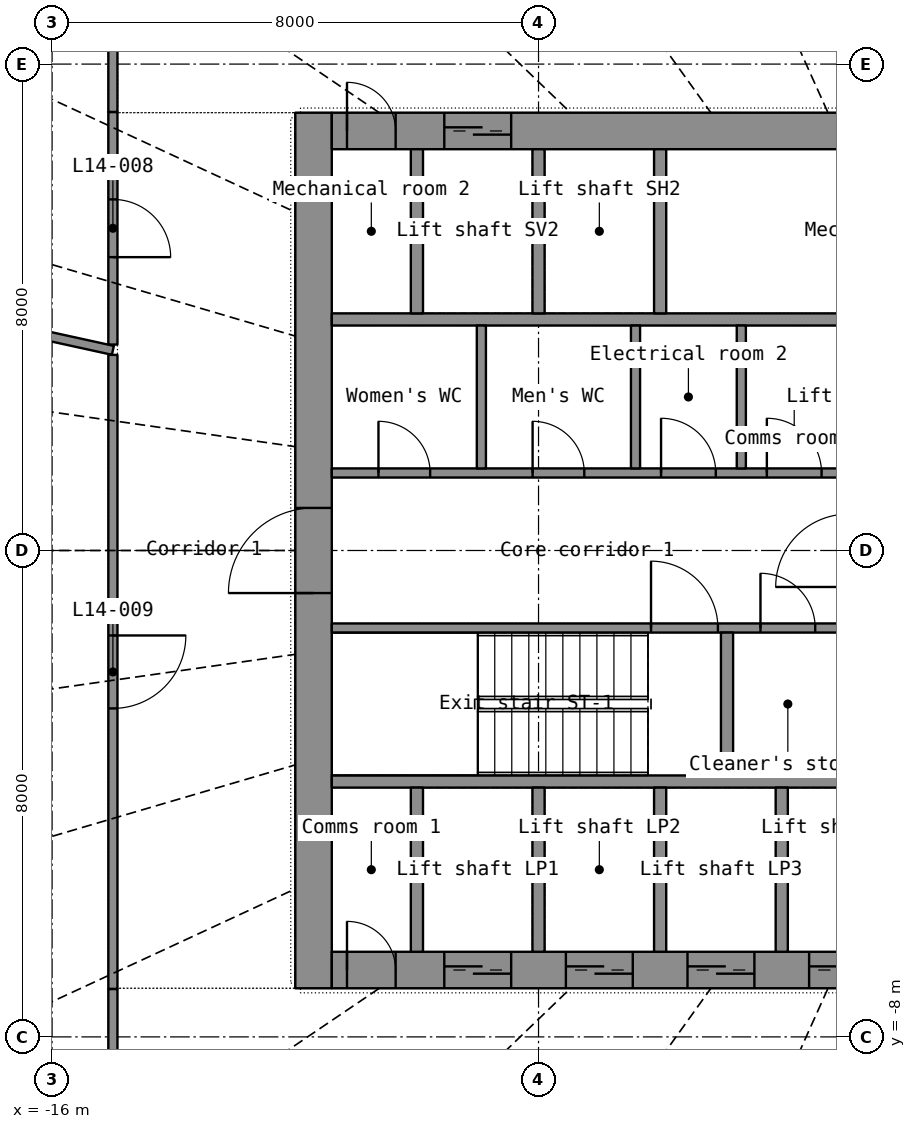
"""IFC4 building model, lengths in metres.
Left out: names, types, materials, properties, quantities, classifications, styles, units other than length and angle.
Written with IfcOpenShell. Run it as: python <this file> out.ifc"""

import sys

from ifc_helpers import new_model, si_unit, direction, frame, frame_2d, origin, place, context, subcontext, project, spatial, rectangle, extrude, element, fill, save


model = new_model("IFC4")
c1 = context("Model", 3, precision=1e-05, world=origin(), true_north=direction((0.0, 1.0)))
c2 = subcontext(c1, "Body", "Model", "MODEL_VIEW")
j1 = project(units=[si_unit("LENGTHUNIT", "METRE"), si_unit("PLANEANGLEUNIT", "RADIAN")], contexts=[c1])
p1 = place(None, origin())
s1 = spatial("IfcSite", under=j1, at=p1, CompositionType="ELEMENT")
p2 = place(p1, origin())
s2 = spatial("IfcBuilding", under=s1, at=p2, CompositionType="ELEMENT")
p3 = place(p2, frame((0.0, 0.0, 63.0)))
s3 = spatial("IfcBuildingStorey", under=s2, at=p3, CompositionType="ELEMENT", Elevation=63.0)
p4 = place(p3, frame((-11.7, -7.2, 0.0), z_axis=(0.0, 0.0, 1.0), x_axis=(0.0, 1.0, 0.0)))
e1 = element("IfcWall", 1, at=p4, inside=s3, PredefinedType="SHEAR", context=c2, shape_type="SweptSolid", body=[
    extrude(rectangle(XDim=14.4, YDim=0.6, at=frame_2d((7.2, 0.0))), origin(), (0.0, 0.0, 1.0), 3.3),
])
p5 = place(p4, frame((6.5, 0.0, 0.0)))
e2 = element("IfcOpeningElement", 2, at=p5, cuts=e1, PredefinedType="OPENING", context=c2, shape_type="SweptSolid", body=[
    extrude(rectangle(XDim=1.4, YDim=2.2, at=frame_2d((0.7, 1.1))), frame((0.0, 0.31, 0.0), z_axis=(0.0, -1.0, 0.0), x_axis=(1.0, 0.0, 0.0)), (0.0, 0.0, 1.0), 0.62),
])
p6 = place(p3, frame((-11.4, -6.9, 0.0), z_axis=(0.0, 0.0, 1.0), x_axis=(1.0, 0.0, 0.0)))
e3 = element("IfcWall", 3, at=p6, inside=s3, PredefinedType="SHEAR", context=c2, shape_type="SweptSolid", body=[
    extrude(rectangle(XDim=22.8, YDim=0.6, at=frame_2d((11.4, 0.0))), origin(), (0.0, 0.0, 1.0), 3.3),
])
p7 = place(p6, frame((1.85, 0.0, 0.0)))
e4 = element("IfcOpeningElement", 4, at=p7, cuts=e3, PredefinedType="OPENING", context=c2, shape_type="SweptSolid", body=[
    extrude(rectangle(XDim=1.1, YDim=2.2, at=frame_2d((0.55, 1.1))), frame((0.0, 0.31, 0.0), z_axis=(0.0, -1.0, 0.0), x_axis=(1.0, 0.0, 0.0)), (0.0, 0.0, 1.0), 0.62),
])
p8 = place(p6, frame((3.85, 0.0, 0.0)))
e5 = element("IfcOpeningElement", 5, at=p8, cuts=e3, PredefinedType="OPENING", context=c2, shape_type="SweptSolid", body=[
    extrude(rectangle(XDim=1.1, YDim=2.2, at=frame_2d((0.55, 1.1))), frame((0.0, 0.31, 0.0), z_axis=(0.0, -1.0, 0.0), x_axis=(1.0, 0.0, 0.0)), (0.0, 0.0, 1.0), 0.62),
])
p9 = place(p6, frame((5.85, 0.0, 0.0)))
e6 = element("IfcOpeningElement", 6, at=p9, cuts=e3, PredefinedType="OPENING", context=c2, shape_type="SweptSolid", body=[
    extrude(rectangle(XDim=1.1, YDim=2.2, at=frame_2d((0.55, 1.1))), frame((0.0, 0.31, 0.0), z_axis=(0.0, -1.0, 0.0), x_axis=(1.0, 0.0, 0.0)), (0.0, 0.0, 1.0), 0.62),
])
p10 = place(p6, frame((7.85, 0.0, 0.0)))
e7 = element("IfcOpeningElement", 7, at=p10, cuts=e3, PredefinedType="OPENING", context=c2, shape_type="SweptSolid", body=[
    extrude(rectangle(XDim=1.1, YDim=2.2, at=frame_2d((0.55, 1.1))), frame((0.0, 0.31, 0.0), z_axis=(0.0, -1.0, 0.0), x_axis=(1.0, 0.0, 0.0)), (0.0, 0.0, 1.0), 0.62),
])
p11 = place(p6, frame((9.85, 0.0, 0.0)))
e8 = element("IfcOpeningElement", 8, at=p11, cuts=e3, PredefinedType="OPENING", context=c2, shape_type="SweptSolid", body=[
    extrude(rectangle(XDim=1.1, YDim=2.2, at=frame_2d((0.55, 1.1))), frame((0.0, 0.31, 0.0), z_axis=(0.0, -1.0, 0.0), x_axis=(1.0, 0.0, 0.0)), (0.0, 0.0, 1.0), 0.62),
])
p12 = place(p6, frame((11.85, 0.0, 0.0)))
e9 = element("IfcOpeningElement", 9, at=p12, cuts=e3, PredefinedType="OPENING", context=c2, shape_type="SweptSolid", body=[
    extrude(rectangle(XDim=1.1, YDim=2.2, at=frame_2d((0.55, 1.1))), frame((0.0, 0.31, 0.0), z_axis=(0.0, -1.0, 0.0), x_axis=(1.0, 0.0, 0.0)), (0.0, 0.0, 1.0), 0.62),
])
p13 = place(p6, frame((13.85, 0.0, 0.0)))
e10 = element("IfcOpeningElement", 10, at=p13, cuts=e3, PredefinedType="OPENING", context=c2, shape_type="SweptSolid", body=[
    extrude(rectangle(XDim=1.1, YDim=2.2, at=frame_2d((0.55, 1.1))), frame((0.0, 0.31, 0.0), z_axis=(0.0, -1.0, 0.0), x_axis=(1.0, 0.0, 0.0)), (0.0, 0.0, 1.0), 0.62),
])
p14 = place(p6, frame((15.85, 0.0, 0.0)))
e11 = element("IfcOpeningElement", 11, at=p14, cuts=e3, PredefinedType="OPENING", context=c2, shape_type="SweptSolid", body=[
    extrude(rectangle(XDim=1.1, YDim=2.2, at=frame_2d((0.55, 1.1))), frame((0.0, 0.31, 0.0), z_axis=(0.0, -1.0, 0.0), x_axis=(1.0, 0.0, 0.0)), (0.0, 0.0, 1.0), 0.62),
])
p15 = place(p6, frame((19.85, 0.0, 0.0)))
e12 = element("IfcOpeningElement", 12, at=p15, cuts=e3, PredefinedType="OPENING", context=c2, shape_type="SweptSolid", body=[
    extrude(rectangle(XDim=1.1, YDim=2.2, at=frame_2d((0.55, 1.1))), frame((0.0, 0.31, 0.0), z_axis=(0.0, -1.0, 0.0), x_axis=(1.0, 0.0, 0.0)), (0.0, 0.0, 1.0), 0.62),
])
p16 = place(p6, frame((0.25, 0.0, 0.0)))
e13 = element("IfcOpeningElement", 13, at=p16, cuts=e3, PredefinedType="OPENING", context=c2, shape_type="SweptSolid", body=[
    extrude(rectangle(XDim=0.8, YDim=2.05, at=frame_2d((0.4, 1.025))), frame((0.0, 0.31, 0.0), z_axis=(0.0, -1.0, 0.0), x_axis=(1.0, 0.0, 0.0)), (0.0, 0.0, 1.0), 0.62),
])
p17 = place(p6, frame((21.75, 0.0, 0.0)))
e14 = element("IfcOpeningElement", 14, at=p17, cuts=e3, PredefinedType="OPENING", context=c2, shape_type="SweptSolid", body=[
    extrude(rectangle(XDim=0.8, YDim=2.05, at=frame_2d((0.4, 1.025))), frame((0.0, 0.31, 0.0), z_axis=(0.0, -1.0, 0.0), x_axis=(1.0, 0.0, 0.0)), (0.0, 0.0, 1.0), 0.62),
])
p18 = place(p3, frame((-11.4, 6.9, 0.0), z_axis=(0.0, 0.0, 1.0), x_axis=(1.0, 0.0, 0.0)))
e15 = element("IfcWall", 15, at=p18, inside=s3, PredefinedType="SHEAR", context=c2, shape_type="SweptSolid", body=[
    extrude(rectangle(XDim=22.8, YDim=0.6, at=frame_2d((11.4, 0.0))), origin(), (0.0, 0.0, 1.0), 3.3),
])
p19 = place(p18, frame((1.85, 0.0, 0.0)))
e16 = element("IfcOpeningElement", 16, at=p19, cuts=e15, PredefinedType="OPENING", context=c2, shape_type="SweptSolid", body=[
    extrude(rectangle(XDim=1.1, YDim=2.2, at=frame_2d((0.55, 1.1))), frame((0.0, 0.31, 0.0), z_axis=(0.0, -1.0, 0.0), x_axis=(1.0, 0.0, 0.0)), (0.0, 0.0, 1.0), 0.62),
])
p20 = place(p18, frame((8.95, 0.0, 0.0)))
e17 = element("IfcOpeningElement", 17, at=p20, cuts=e15, PredefinedType="OPENING", context=c2, shape_type="SweptSolid", body=[
    extrude(rectangle(XDim=0.9, YDim=2.1, at=frame_2d((0.45, 1.05))), frame((0.0, 0.31, 0.0), z_axis=(0.0, -1.0, 0.0), x_axis=(1.0, 0.0, 0.0)), (0.0, 0.0, 1.0), 0.62),
])
p21 = place(p18, frame((14.95, 0.0, 0.0)))
e18 = element("IfcOpeningElement", 18, at=p21, cuts=e15, PredefinedType="OPENING", context=c2, shape_type="SweptSolid", body=[
    extrude(rectangle(XDim=0.9, YDim=2.1, at=frame_2d((0.45, 1.05))), frame((0.0, 0.31, 0.0), z_axis=(0.0, -1.0, 0.0), x_axis=(1.0, 0.0, 0.0)), (0.0, 0.0, 1.0), 0.62),
])
p22 = place(p18, frame((18.95, 0.0, 0.0)))
e19 = element("IfcOpeningElement", 19, at=p22, cuts=e15, PredefinedType="OPENING", context=c2, shape_type="SweptSolid", body=[
    extrude(rectangle(XDim=0.9, YDim=2.1, at=frame_2d((0.45, 1.05))), frame((0.0, 0.31, 0.0), z_axis=(0.0, -1.0, 0.0), x_axis=(1.0, 0.0, 0.0)), (0.0, 0.0, 1.0), 0.62),
])
p23 = place(p18, frame((0.25, 0.0, 0.0)))
e20 = element("IfcOpeningElement", 20, at=p23, cuts=e15, PredefinedType="OPENING", context=c2, shape_type="SweptSolid", body=[
    extrude(rectangle(XDim=0.8, YDim=2.05, at=frame_2d((0.4, 1.025))), frame((0.0, 0.31, 0.0), z_axis=(0.0, -1.0, 0.0), x_axis=(1.0, 0.0, 0.0)), (0.0, 0.0, 1.0), 0.62),
])
p24 = place(p18, frame((21.75, 0.0, 0.0)))
e21 = element("IfcOpeningElement", 21, at=p24, cuts=e15, PredefinedType="OPENING", context=c2, shape_type="SweptSolid", body=[
    extrude(rectangle(XDim=0.8, YDim=2.05, at=frame_2d((0.4, 1.025))), frame((0.0, 0.31, 0.0), z_axis=(0.0, -1.0, 0.0), x_axis=(1.0, 0.0, 0.0)), (0.0, 0.0, 1.0), 0.62),
])
for number, where, z_axis, x_axis in (
    (22, (-11.4, -3.8, 0.0), (0.0, 0.0, 1.0), (1.0, 0.0, 0.0)),
    (23, (-11.4, 3.8, 0.0), (0.0, 0.0, 1.0), (1.0, 0.0, 0.0)),
):
    element("IfcWall", number, at=place(p3, frame(where, z_axis=z_axis, x_axis=x_axis)), inside=s3, PredefinedType="SHEAR", context=c2, shape_type="SweptSolid", body=[
        extrude(rectangle(XDim=22.8, YDim=0.2, at=frame_2d((11.4, 0.0))), origin(), (0.0, 0.0, 1.0), 3.3),
    ])
for number, where, z_axis, x_axis in (
    (24, (-10.0, -6.6, 0.0), (0.0, 0.0, 1.0), (0.0, 1.0, 0.0)),
    (25, (-8.0, -6.6, 0.0), (0.0, 0.0, 1.0), (0.0, 1.0, 0.0)),
    (26, (-6.0, -6.6, 0.0), (0.0, 0.0, 1.0), (0.0, 1.0, 0.0)),
    (27, (-4.0, -6.6, 0.0), (0.0, 0.0, 1.0), (0.0, 1.0, 0.0)),
    (28, (-10.0, 3.9, 0.0), (0.0, 0.0, 1.0), (0.0, 1.0, 0.0)),
    (29, (-8.0, 3.9, 0.0), (0.0, 0.0, 1.0), (0.0, 1.0, 0.0)),
    (30, (-6.0, 3.9, 0.0), (0.0, 0.0, 1.0), (0.0, 1.0, 0.0)),
):
    element("IfcWall", number, at=place(p3, frame(where, z_axis=z_axis, x_axis=x_axis)), inside=s3, PredefinedType="SHEAR", context=c2, shape_type="SweptSolid", body=[
        extrude(rectangle(XDim=2.7, YDim=0.2, at=frame_2d((1.35, 0.0))), origin(), (0.0, 0.0, 1.0), 3.3),
    ])
p25 = place(p3, frame((-11.4, -1.275, 0.0), z_axis=(0.0, 0.0, 1.0), x_axis=(1.0, 0.0, 0.0)))
e31 = element("IfcWall", 31, at=p25, inside=s3, PredefinedType="SHEAR", context=c2, shape_type="SweptSolid", body=[
    extrude(rectangle(XDim=8.4, YDim=0.15, at=frame_2d((4.2, 0.0))), origin(), (0.0, 0.0, 1.0), 3.3),
])
p26 = place(p25, frame((5.25, 0.0, 0.0)))
e32 = element("IfcOpeningElement", 32, at=p26, cuts=e31, PredefinedType="OPENING", context=c2, shape_type="SweptSolid", body=[
    extrude(rectangle(XDim=1.1, YDim=2.15, at=frame_2d((0.55, 1.075))), frame((0.0, 0.085, 0.0), z_axis=(0.0, -1.0, 0.0), x_axis=(1.0, 0.0, 0.0)), (0.0, 0.0, 1.0), 0.17),
])
p27 = place(p25, frame((7.05, 0.0, 0.0)))
e33 = element("IfcOpeningElement", 33, at=p27, cuts=e31, PredefinedType="OPENING", context=c2, shape_type="SweptSolid", body=[
    extrude(rectangle(XDim=0.9, YDim=2.1, at=frame_2d((0.45, 1.05))), frame((0.0, 0.085, 0.0), z_axis=(0.0, -1.0, 0.0), x_axis=(1.0, 0.0, 0.0)), (0.0, 0.0, 1.0), 0.17),
])
p28 = place(p3, frame((-11.4, 1.275, 0.0), z_axis=(0.0, 0.0, 1.0), x_axis=(1.0, 0.0, 0.0)))
e34 = element("IfcWall", 34, at=p28, inside=s3, PredefinedType="PARTITIONING", context=c2, shape_type="SweptSolid", body=[
    extrude(rectangle(XDim=8.4, YDim=0.15, at=frame_2d((4.2, 0.0))), origin(), (0.0, 0.0, 1.0), 3.3),
])
p29 = place(p28, frame((0.768, 0.0, 0.0)))
e35 = element("IfcOpeningElement", 35, at=p29, cuts=e34, PredefinedType="OPENING", context=c2, shape_type="SweptSolid", body=[
    extrude(rectangle(XDim=0.85, YDim=2.1, at=frame_2d((0.425, 1.05))), frame((0.0, 0.085, 0.0), z_axis=(0.0, -1.0, 0.0), x_axis=(1.0, 0.0, 0.0)), (0.0, 0.0, 1.0), 0.17),
])
p30 = place(p28, frame((3.302, 0.0, 0.0)))
e36 = element("IfcOpeningElement", 36, at=p30, cuts=e34, PredefinedType="OPENING", context=c2, shape_type="SweptSolid", body=[
    extrude(rectangle(XDim=0.85, YDim=2.1, at=frame_2d((0.425, 1.05))), frame((0.0, 0.085, 0.0), z_axis=(0.0, -1.0, 0.0), x_axis=(1.0, 0.0, 0.0)), (0.0, 0.0, 1.0), 0.17),
])
p31 = place(p28, frame((5.415, 0.0, 0.0)))
e37 = element("IfcOpeningElement", 37, at=p31, cuts=e34, PredefinedType="OPENING", context=c2, shape_type="SweptSolid", body=[
    extrude(rectangle(XDim=0.9, YDim=2.1, at=frame_2d((0.45, 1.05))), frame((0.0, 0.085, 0.0), z_axis=(0.0, -1.0, 0.0), x_axis=(1.0, 0.0, 0.0)), (0.0, 0.0, 1.0), 0.17),
])
p32 = place(p28, frame((7.155, 0.0, 0.0)))
e38 = element("IfcOpeningElement", 38, at=p32, cuts=e34, PredefinedType="OPENING", context=c2, shape_type="SweptSolid", body=[
    extrude(rectangle(XDim=0.9, YDim=2.1, at=frame_2d((0.45, 1.05))), frame((0.0, 0.085, 0.0), z_axis=(0.0, -1.0, 0.0), x_axis=(1.0, 0.0, 0.0)), (0.0, 0.0, 1.0), 0.17),
])
p33 = place(p3, frame((-4.9, -3.7, 0.0), z_axis=(0.0, 0.0, 1.0), x_axis=(0.0, 1.0, 0.0)))
e39 = element("IfcWall", 39, at=p33, inside=s3, PredefinedType="SHEAR", context=c2, shape_type="SweptSolid", body=[
    extrude(rectangle(XDim=2.35, YDim=0.2, at=frame_2d((1.175, 0.0))), origin(), (0.0, 0.0, 1.0), 3.3),
])
for number, where, z_axis, x_axis in (
    (40, (-8.94, 1.35, 0.0), (0.0, 0.0, 1.0), (0.0, 1.0, 0.0)),
    (41, (-6.405, 1.35, 0.0), (0.0, 0.0, 1.0), (0.0, 1.0, 0.0)),
    (42, (-4.665, 1.35, 0.0), (0.0, 0.0, 1.0), (0.0, 1.0, 0.0)),
):
    element("IfcWall", number, at=place(p3, frame(where, z_axis=z_axis, x_axis=x_axis)), inside=s3, PredefinedType="PARTITIONING", context=c2, shape_type="SweptSolid", body=[
        extrude(rectangle(XDim=2.35, YDim=0.15, at=frame_2d((1.175, 0.0))), origin(), (0.0, 0.0, 1.0), 3.3),
    ])
p34 = place(p3, frame((-26.25, 5.761, 0.0), z_axis=(0.0, 0.0, 1.0), x_axis=(0.976751272, -0.214375729, 0.0)))
e43 = element("IfcWall", 43, at=p34, inside=s3, PredefinedType="PARTITIONING", context=c2, shape_type="SweptSolid", body=[
    extrude(rectangle(XDim=11.518, YDim=0.15, at=frame_2d((5.759, 0.0))), origin(), (0.0, 0.0, 1.0), 2.4),
])
p35 = place(p3, frame((-15.0, 3.217, 0.0), z_axis=(0.0, 0.0, 1.0), x_axis=(0.0, -1.0, 0.0)))
e44 = element("IfcWall", 44, at=p35, inside=s3, PredefinedType="PARTITIONING", context=c2, shape_type="SweptSolid", body=[
    extrude(rectangle(XDim=10.429, YDim=0.15, at=frame_2d((5.214, 0.0))), origin(), (0.0, 0.0, 1.0), 2.4),
])
p36 = place(p35, frame((4.615, 0.0, 0.0)))
e45 = element("IfcOpeningElement", 45, at=p36, cuts=e44, PredefinedType="OPENING", context=c2, shape_type="SweptSolid", body=[
    extrude(rectangle(XDim=1.2, YDim=2.2, at=frame_2d((0.6, 1.1))), frame((0.0, 0.085, 0.0), z_axis=(0.0, -1.0, 0.0), x_axis=(1.0, 0.0, 0.0)), (0.0, 0.0, 1.0), 0.17),
])
p37 = place(p3, frame((-15.0, 7.212, 0.0), z_axis=(0.0, 0.0, 1.0), x_axis=(0.0, -1.0, 0.0)))
e46 = element("IfcWall", 46, at=p37, inside=s3, PredefinedType="PARTITIONING", context=c2, shape_type="SweptSolid", body=[
    extrude(rectangle(XDim=3.824, YDim=0.15, at=frame_2d((1.912, 0.0))), origin(), (0.0, 0.0, 1.0), 2.4),
])
p38 = place(p37, frame((1.437, 0.0, 0.0)))
e47 = element("IfcOpeningElement", 47, at=p38, cuts=e46, PredefinedType="OPENING", context=c2, shape_type="SweptSolid", body=[
    extrude(rectangle(XDim=0.95, YDim=2.15, at=frame_2d((0.475, 1.075))), frame((0.0, 0.085, 0.0), z_axis=(0.0, -1.0, 0.0), x_axis=(1.0, 0.0, 0.0)), (0.0, 0.0, 1.0), 0.17),
])
p39 = place(p3, frame((-15.0, 10.8, 0.0), z_axis=(0.0, 0.0, 1.0), x_axis=(0.0, -1.0, 0.0)))
e48 = element("IfcWall", 48, at=p39, inside=s3, PredefinedType="PARTITIONING", context=c2, shape_type="SweptSolid", body=[
    extrude(rectangle(XDim=3.587, YDim=0.15, at=frame_2d((1.793, 0.0))), origin(), (0.0, 0.0, 1.0), 2.4),
])
p40 = place(p3, frame((-15.0, -7.213, 0.0), z_axis=(0.0, 0.0, 1.0), x_axis=(0.0, -1.0, 0.0)))
e49 = element("IfcWall", 49, at=p40, inside=s3, PredefinedType="PARTITIONING", context=c2, shape_type="SweptSolid", body=[
    extrude(rectangle(XDim=2.31, YDim=0.15, at=frame_2d((1.155, 0.0))), origin(), (0.0, 0.0, 1.0), 2.4),
])
p41 = place(p7, origin())
e50 = element("IfcDoor", 50, at=p41, inside=s3, OperationType="DOUBLE_DOOR_SLIDING", PredefinedType="DOOR", context=c2, shape_type="SweptSolid", body=[
    extrude(rectangle(XDim=1.1, YDim=2.2, at=frame_2d((0.55, 1.1))), frame((0.0, 0.025, 0.0), z_axis=(0.0, -1.0, 0.0), x_axis=(1.0, 0.0, 0.0)), (0.0, 0.0, 1.0), 0.05),
])
fill(e4, e50)
p42 = place(p8, origin())
e51 = element("IfcDoor", 51, at=p42, inside=s3, OperationType="DOUBLE_DOOR_SLIDING", PredefinedType="DOOR", context=c2, shape_type="SweptSolid", body=[
    extrude(rectangle(XDim=1.1, YDim=2.2, at=frame_2d((0.55, 1.1))), frame((0.0, 0.025, 0.0), z_axis=(0.0, -1.0, 0.0), x_axis=(1.0, 0.0, 0.0)), (0.0, 0.0, 1.0), 0.05),
])
fill(e5, e51)
p43 = place(p9, origin())
e52 = element("IfcDoor", 52, at=p43, inside=s3, OperationType="DOUBLE_DOOR_SLIDING", PredefinedType="DOOR", context=c2, shape_type="SweptSolid", body=[
    extrude(rectangle(XDim=1.1, YDim=2.2, at=frame_2d((0.55, 1.1))), frame((0.0, 0.025, 0.0), z_axis=(0.0, -1.0, 0.0), x_axis=(1.0, 0.0, 0.0)), (0.0, 0.0, 1.0), 0.05),
])
fill(e6, e52)
p44 = place(p10, origin())
e53 = element("IfcDoor", 53, at=p44, inside=s3, OperationType="DOUBLE_DOOR_SLIDING", PredefinedType="DOOR", context=c2, shape_type="SweptSolid", body=[
    extrude(rectangle(XDim=1.1, YDim=2.2, at=frame_2d((0.55, 1.1))), frame((0.0, 0.025, 0.0), z_axis=(0.0, -1.0, 0.0), x_axis=(1.0, 0.0, 0.0)), (0.0, 0.0, 1.0), 0.05),
])
fill(e7, e53)
p45 = place(p16, origin())
e54 = element("IfcDoor", 54, at=p45, inside=s3, OperationType="SINGLE_SWING_LEFT", PredefinedType="DOOR", context=c2, shape_type="SweptSolid", body=[
    extrude(rectangle(XDim=0.8, YDim=2.05, at=frame_2d((0.4, 1.025))), frame((0.0, 0.025, 0.0), z_axis=(0.0, -1.0, 0.0), x_axis=(1.0, 0.0, 0.0)), (0.0, 0.0, 1.0), 0.05),
])
fill(e13, e54)
p46 = place(p19, origin())
e55 = element("IfcDoor", 55, at=p46, inside=s3, OperationType="DOUBLE_DOOR_SLIDING", PredefinedType="DOOR", context=c2, shape_type="SweptSolid", body=[
    extrude(rectangle(XDim=1.1, YDim=2.2, at=frame_2d((0.55, 1.1))), frame((0.0, 0.025, 0.0), z_axis=(0.0, -1.0, 0.0), x_axis=(1.0, 0.0, 0.0)), (0.0, 0.0, 1.0), 0.05),
])
fill(e16, e55)
p47 = place(p23, origin())
e56 = element("IfcDoor", 56, at=p47, inside=s3, OperationType="SINGLE_SWING_LEFT", PredefinedType="DOOR", context=c2, shape_type="SweptSolid", body=[
    extrude(rectangle(XDim=0.8, YDim=2.05, at=frame_2d((0.4, 1.025))), frame((0.0, 0.025, 0.0), z_axis=(0.0, -1.0, 0.0), x_axis=(1.0, 0.0, 0.0)), (0.0, 0.0, 1.0), 0.05),
])
fill(e20, e56)
p48 = place(p5, origin())
e57 = element("IfcDoor", 57, at=p48, inside=s3, OperationType="DOUBLE_DOOR_SINGLE_SWING", PredefinedType="DOOR", context=c2, shape_type="SweptSolid", body=[
    extrude(rectangle(XDim=1.4, YDim=2.2, at=frame_2d((0.7, 1.1))), frame((0.0, 0.025, 0.0), z_axis=(0.0, -1.0, 0.0), x_axis=(1.0, 0.0, 0.0)), (0.0, 0.0, 1.0), 0.05),
])
fill(e2, e57)
p49 = place(p26, origin())
e58 = element("IfcDoor", 58, at=p49, inside=s3, OperationType="SINGLE_SWING_LEFT", PredefinedType="DOOR", context=c2, shape_type="SweptSolid", body=[
    extrude(rectangle(XDim=1.1, YDim=2.15, at=frame_2d((0.55, 1.075))), frame((0.0, 0.025, 0.0), z_axis=(0.0, -1.0, 0.0), x_axis=(1.0, 0.0, 0.0)), (0.0, 0.0, 1.0), 0.05),
])
fill(e32, e58)
p50 = place(p29, origin())
e59 = element("IfcDoor", 59, at=p50, inside=s3, OperationType="SINGLE_SWING_LEFT", PredefinedType="DOOR", context=c2, shape_type="SweptSolid", body=[
    extrude(rectangle(XDim=0.85, YDim=2.1, at=frame_2d((0.425, 1.05))), frame((0.0, 0.025, 0.0), z_axis=(0.0, -1.0, 0.0), x_axis=(1.0, 0.0, 0.0)), (0.0, 0.0, 1.0), 0.05),
])
fill(e35, e59)
p51 = place(p30, origin())
e60 = element("IfcDoor", 60, at=p51, inside=s3, OperationType="SINGLE_SWING_LEFT", PredefinedType="DOOR", context=c2, shape_type="SweptSolid", body=[
    extrude(rectangle(XDim=0.85, YDim=2.1, at=frame_2d((0.425, 1.05))), frame((0.0, 0.025, 0.0), z_axis=(0.0, -1.0, 0.0), x_axis=(1.0, 0.0, 0.0)), (0.0, 0.0, 1.0), 0.05),
])
fill(e36, e60)
p52 = place(p31, origin())
e61 = element("IfcDoor", 61, at=p52, inside=s3, OperationType="SINGLE_SWING_LEFT", PredefinedType="DOOR", context=c2, shape_type="SweptSolid", body=[
    extrude(rectangle(XDim=0.9, YDim=2.1, at=frame_2d((0.45, 1.05))), frame((0.0, 0.025, 0.0), z_axis=(0.0, -1.0, 0.0), x_axis=(1.0, 0.0, 0.0)), (0.0, 0.0, 1.0), 0.05),
])
fill(e37, e61)
p53 = place(p32, origin())
e62 = element("IfcDoor", 62, at=p53, inside=s3, OperationType="SINGLE_SWING_LEFT", PredefinedType="DOOR", context=c2, shape_type="SweptSolid", body=[
    extrude(rectangle(XDim=0.9, YDim=2.1, at=frame_2d((0.45, 1.05))), frame((0.0, 0.025, 0.0), z_axis=(0.0, -1.0, 0.0), x_axis=(1.0, 0.0, 0.0)), (0.0, 0.0, 1.0), 0.05),
])
fill(e38, e62)
p54 = place(p27, origin())
e63 = element("IfcDoor", 63, at=p54, inside=s3, OperationType="SINGLE_SWING_LEFT", PredefinedType="DOOR", context=c2, shape_type="SweptSolid", body=[
    extrude(rectangle(XDim=0.9, YDim=2.1, at=frame_2d((0.45, 1.05))), frame((0.0, 0.025, 0.0), z_axis=(0.0, -1.0, 0.0), x_axis=(1.0, 0.0, 0.0)), (0.0, 0.0, 1.0), 0.05),
])
fill(e33, e63)
p55 = place(p38, origin())
e64 = element("IfcDoor", 64, at=p55, inside=s3, OperationType="SINGLE_SWING_RIGHT", PredefinedType="DOOR", context=c2, shape_type="SweptSolid", body=[
    extrude(rectangle(XDim=0.95, YDim=2.15, at=frame_2d((0.475, 1.075))), frame((0.0, 0.025, 0.0), z_axis=(0.0, -1.0, 0.0), x_axis=(1.0, 0.0, 0.0)), (0.0, 0.0, 1.0), 0.05),
])
fill(e47, e64)
p56 = place(p36, origin())
e65 = element("IfcDoor", 65, at=p56, inside=s3, OperationType="DOUBLE_DOOR_SINGLE_SWING", PredefinedType="DOOR", context=c2, shape_type="SweptSolid", body=[
    extrude(rectangle(XDim=1.2, YDim=2.2, at=frame_2d((0.6, 1.1))), frame((0.0, 0.025, 0.0), z_axis=(0.0, -1.0, 0.0), x_axis=(1.0, 0.0, 0.0)), (0.0, 0.0, 1.0), 0.05),
])
fill(e45, e65)
save(model, sys.argv[1])
